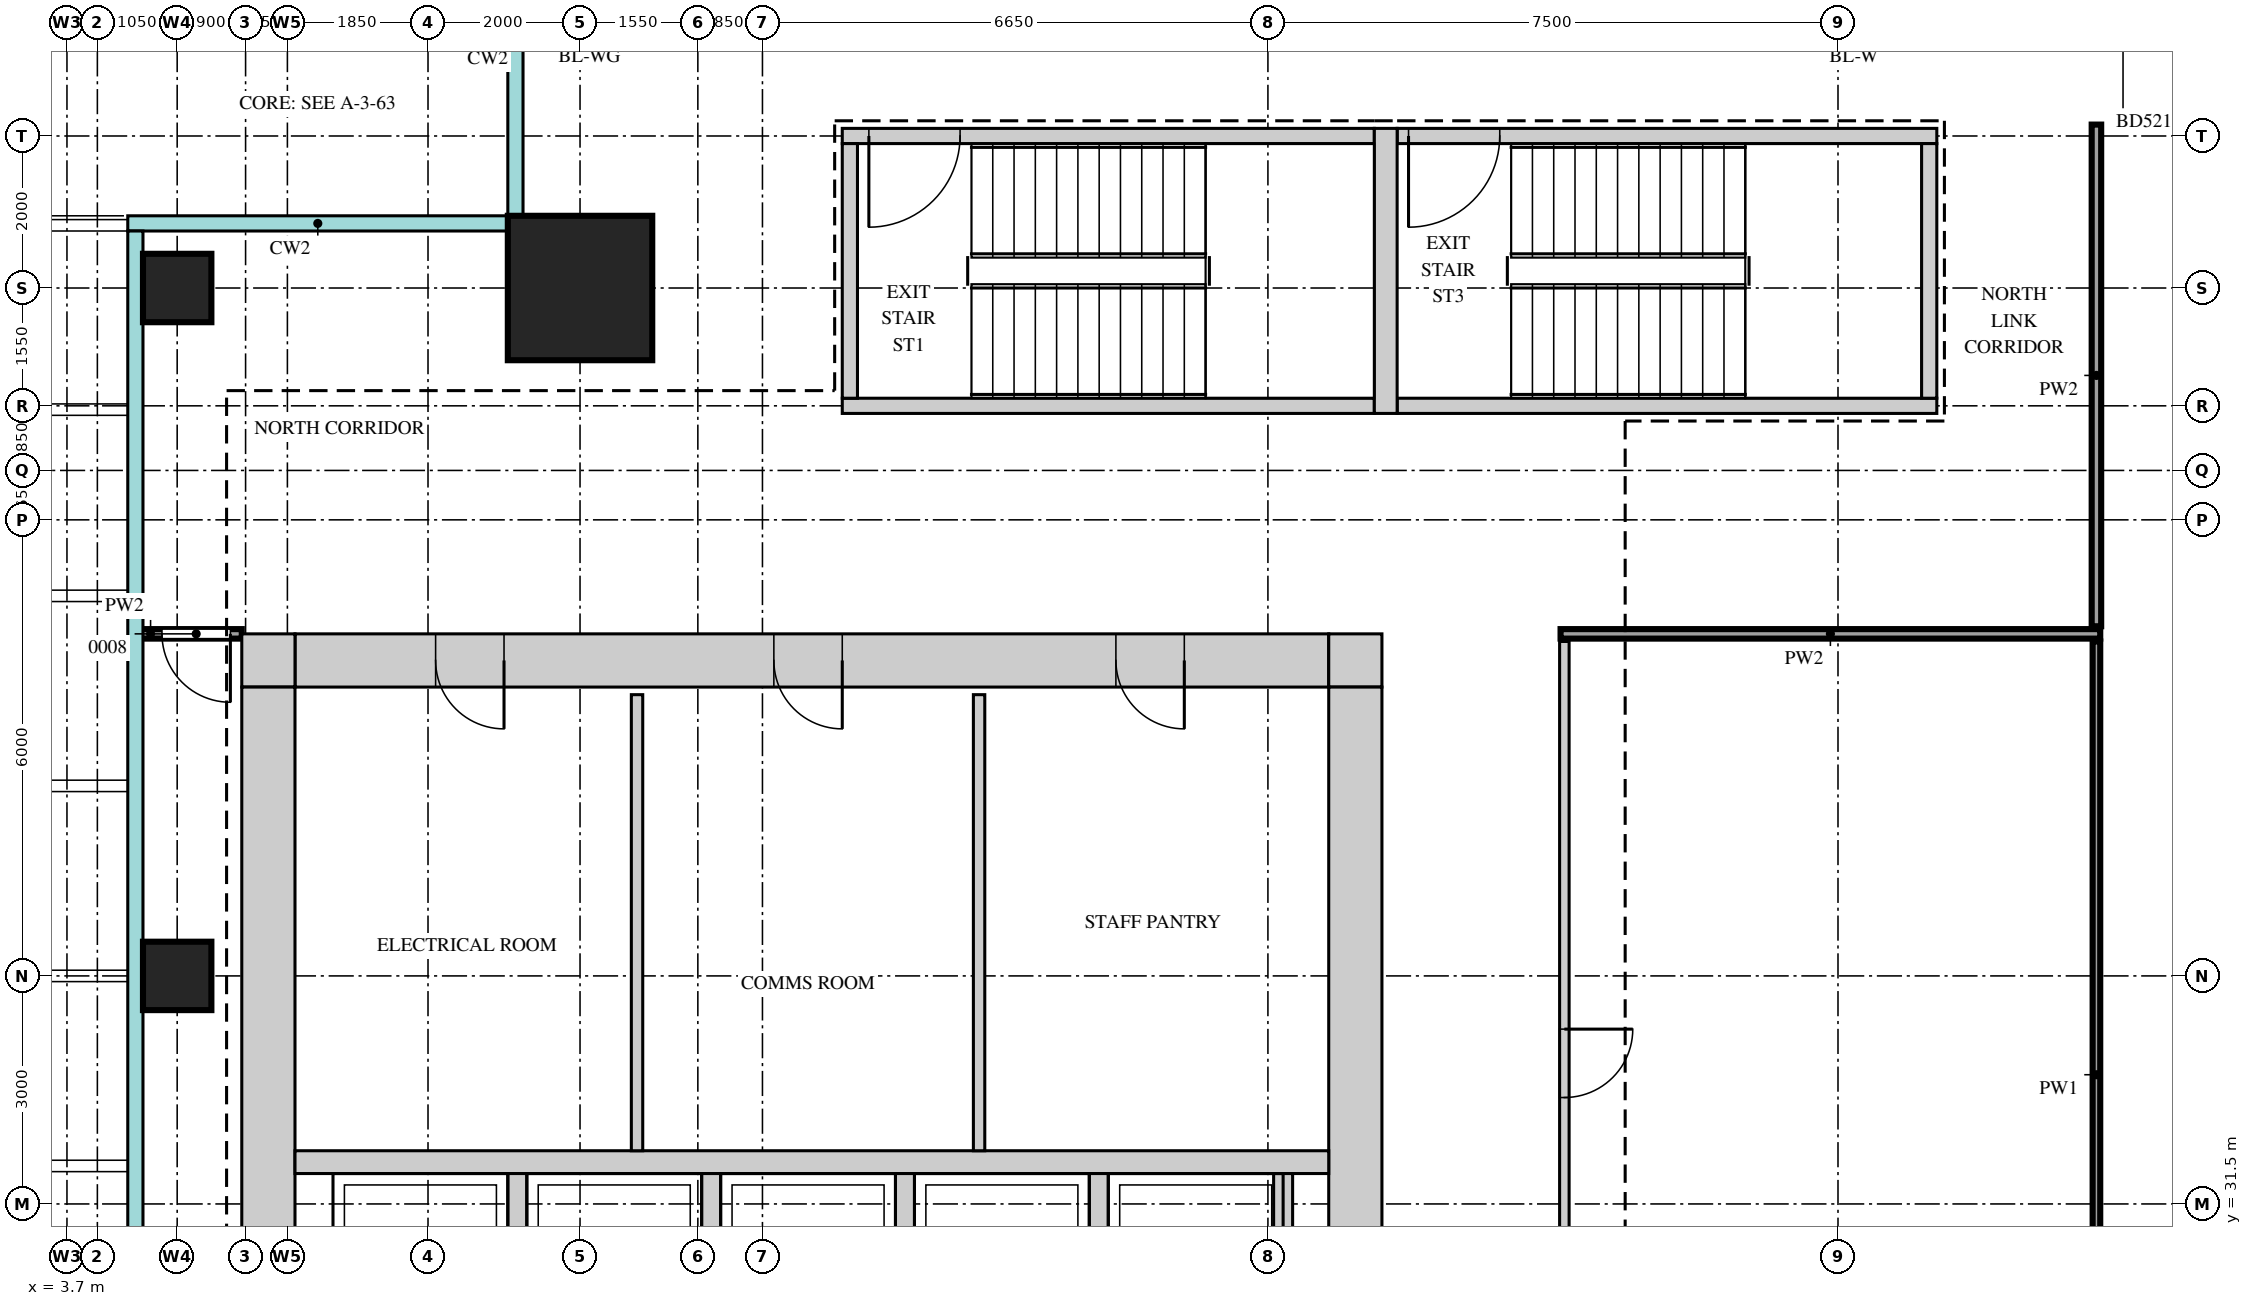
"""IFC4 building model, lengths in metres.
Left out: names, types, materials, properties, quantities, classifications, styles, units other than length and angle.
Written with IfcOpenShell. Run it as: python <this file> out.ifc"""

import sys

from ifc_helpers import new_model, si_unit, direction, frame, frame_2d, origin, origin_2d, place, context, subcontext, project, spatial, rectangle, extrude, source, transform, mapped, element, fill, save


model = new_model("IFC4")
c1 = context("Model", 3, precision=1e-05, world=origin(), true_north=direction((0.0, 1.0)))
c2 = subcontext(c1, "Body", "Model", "MODEL_VIEW")
j1 = project(units=[si_unit("LENGTHUNIT", "METRE"), si_unit("PLANEANGLEUNIT", "RADIAN")], contexts=[c1])
p1 = place(None, origin())
s1 = spatial("IfcSite", under=j1, at=p1, CompositionType="ELEMENT")
p2 = place(p1, origin())
s2 = spatial("IfcBuilding", under=s1, at=p2, CompositionType="ELEMENT")
p3 = place(p2, frame((0.0, 0.0, 234.2)))
s3 = spatial("IfcBuildingStorey", under=s2, at=p3, CompositionType="ELEMENT", Elevation=234.2)
m1 = source(origin(), c2, "Body", "SweptSolid", [
    extrude(rectangle(XDim=13.6, YDim=0.7, at=frame_2d((6.8, 0.0))), origin(), (0.0, 0.0, 1.0), 3.75),
])
p4 = place(p3, frame((6.7, 38.65, 0.0), z_axis=(0.0, 0.0, 1.0), x_axis=(1.0, 0.0, 0.0)))
e1 = element("IfcWall", 1, at=p4, inside=s3, PredefinedType="SHEAR", context=c2, shape_type="MappedRepresentation", body=[
    mapped(m1, transform((0.0, 0.0, 0.0))),
])
m2 = source(origin(), c2, "Body", "SweptSolid", [
    extrude(rectangle(XDim=0.9, YDim=2.1, at=frame_2d((0.45, 1.05))), frame((0.0, 0.36, 0.0), z_axis=(0.0, -1.0, 0.0), x_axis=(1.0, 0.0, 0.0)), (0.0, 0.0, 1.0), 0.72),
])
p5 = place(p4, frame((1.85, 0.0, 0.0)))
e2 = element("IfcOpeningElement", 2, at=p5, cuts=e1, PredefinedType="OPENING", context=c2, shape_type="MappedRepresentation", body=[
    mapped(m2, transform((0.0, 0.0, 0.0))),
])
p6 = place(p4, frame((6.3, 0.0, 0.0)))
e3 = element("IfcOpeningElement", 3, at=p6, cuts=e1, PredefinedType="OPENING", context=c2, shape_type="MappedRepresentation", body=[
    mapped(m2, transform((0.0, 0.0, 0.0))),
])
p7 = place(p4, frame((10.8, 0.0, 0.0)))
e4 = element("IfcOpeningElement", 4, at=p7, cuts=e1, PredefinedType="OPENING", context=c2, shape_type="MappedRepresentation", body=[
    mapped(m2, transform((0.0, 0.0, 0.0))),
])
m3 = source(origin(), c2, "Body", "SweptSolid", [
    extrude(rectangle(XDim=0.7, YDim=0.7, at=frame_2d((0.35, 0.0))), origin(), (0.0, 0.0, 1.0), 3.75),
])
for number, where, z_axis, x_axis in (
    (5, (20.3, 38.65, 0.0), (0.0, 0.0, 1.0), (1.0, 0.0, 0.0)),
    (6, (6.0, 38.65, 0.0), (0.0, 0.0, 1.0), (1.0, 0.0, 0.0)),
):
    element("IfcWall", number, at=place(p3, frame(where, z_axis=z_axis, x_axis=x_axis)), inside=s3, PredefinedType="SHEAR", context=c2, shape_type="MappedRepresentation", body=[
        mapped(m3, transform((0.0, 0.0, 0.0))),
    ])
m4 = source(origin(), c2, "Body", "SweptSolid", [
    extrude(rectangle(XDim=22.6, YDim=0.7, at=frame_2d((11.3, 0.0))), origin(), (0.0, 0.0, 1.0), 3.75),
])
p8 = place(p3, frame((20.65, 15.7, 0.0), z_axis=(0.0, 0.0, 1.0), x_axis=(0.0, 1.0, 0.0)))
e7 = element("IfcWall", 7, at=p8, inside=s3, PredefinedType="SHEAR", context=c2, shape_type="MappedRepresentation", body=[
    mapped(m4, transform((0.0, 0.0, 0.0))),
])
m5 = source(origin(), c2, "Body", "SweptSolid", [
    extrude(rectangle(XDim=1.8, YDim=2.1, at=frame_2d((0.9, 1.05))), frame((0.0, 0.36, 0.0), z_axis=(0.0, -1.0, 0.0), x_axis=(1.0, 0.0, 0.0)), (0.0, 0.0, 1.0), 0.72),
])
p9 = place(p8, frame((10.8, 0.0, 0.0)))
e8 = element("IfcOpeningElement", 8, at=p9, cuts=e7, PredefinedType="OPENING", context=c2, shape_type="MappedRepresentation", body=[
    mapped(m5, transform((0.0, 0.0, 0.0))),
])
p10 = place(p8, frame((0.45, 0.0, 0.0)))
e9 = element("IfcOpeningElement", 9, at=p10, cuts=e7, PredefinedType="OPENING", context=c2, shape_type="MappedRepresentation", body=[
    mapped(m2, transform((0.0, 0.0, 0.0))),
])
m6 = source(origin(), c2, "Body", "SweptSolid", [
    extrude(rectangle(XDim=1.0, YDim=2.1, at=frame_2d((0.5, 1.05))), frame((0.0, 0.36, 0.0), z_axis=(0.0, -1.0, 0.0), x_axis=(1.0, 0.0, 0.0)), (0.0, 0.0, 1.0), 0.72),
])
p11 = place(p8, frame((2.2, 0.0, 0.0)))
e10 = element("IfcOpeningElement", 10, at=p11, cuts=e7, PredefinedType="OPENING", context=c2, shape_type="MappedRepresentation", body=[
    mapped(m6, transform((0.0, 0.0, 0.0))),
])
p12 = place(p8, frame((5.0, 0.0, 0.0)))
e11 = element("IfcOpeningElement", 11, at=p12, cuts=e7, PredefinedType="OPENING", context=c2, shape_type="MappedRepresentation", body=[
    mapped(m2, transform((0.0, 0.0, 0.0))),
])
p13 = place(p3, frame((6.35, 15.7, 0.0), z_axis=(0.0, 0.0, 1.0), x_axis=(0.0, 1.0, 0.0)))
e12 = element("IfcWall", 12, at=p13, inside=s3, PredefinedType="SHEAR", context=c2, shape_type="MappedRepresentation", body=[
    mapped(m4, transform((0.0, 0.0, 0.0))),
])
m7 = source(origin(), c2, "Body", "SweptSolid", [
    extrude(rectangle(XDim=7.0, YDim=0.2, at=frame_2d((3.5, 0.0))), origin(), (0.0, 0.0, 1.0), 3.75),
])
p14 = place(p3, frame((13.9, 45.55, 0.0), z_axis=(0.0, 0.0, 1.0), x_axis=(1.0, 0.0, 0.0)))
e13 = element("IfcWall", 13, at=p14, inside=s3, PredefinedType="SHEAR", context=c2, shape_type="MappedRepresentation", body=[
    mapped(m7, transform((0.0, 0.0, 0.0))),
])
m8 = source(origin(), c2, "Body", "SweptSolid", [
    extrude(rectangle(XDim=1.2, YDim=2.1, at=frame_2d((0.6, 1.05))), frame((0.0, 0.11, 0.0), z_axis=(0.0, -1.0, 0.0), x_axis=(1.0, 0.0, 0.0)), (0.0, 0.0, 1.0), 0.22),
])
p15 = place(p14, frame((0.35, 0.0, 0.0)))
e14 = element("IfcOpeningElement", 14, at=p15, cuts=e13, PredefinedType="OPENING", context=c2, shape_type="MappedRepresentation", body=[
    mapped(m8, transform((0.0, 0.0, 0.0))),
])
p16 = place(p3, frame((13.9, 42.0, 0.0), z_axis=(0.0, 0.0, 1.0), x_axis=(1.0, 0.0, 0.0)))
e15 = element("IfcWall", 15, at=p16, inside=s3, PredefinedType="SHEAR", context=c2, shape_type="MappedRepresentation", body=[
    mapped(m7, transform((0.0, 0.0, 0.0))),
])
m9 = source(origin(), c2, "Body", "SweptSolid", [
    extrude(rectangle(XDim=7.1, YDim=0.2, at=frame_2d((3.55, 0.0))), origin(), (0.0, 0.0, 1.0), 3.75),
])
p17 = place(p3, frame((21.2, 45.55, 0.0), z_axis=(0.0, 0.0, 1.0), x_axis=(1.0, 0.0, 0.0)))
e16 = element("IfcWall", 16, at=p17, inside=s3, PredefinedType="SHEAR", context=c2, shape_type="MappedRepresentation", body=[
    mapped(m9, transform((0.0, 0.0, 0.0))),
])
p18 = place(p17, frame((0.15, 0.0, 0.0)))
e17 = element("IfcOpeningElement", 17, at=p18, cuts=e16, PredefinedType="OPENING", context=c2, shape_type="MappedRepresentation", body=[
    mapped(m8, transform((0.0, 0.0, 0.0))),
])
p19 = place(p3, frame((21.2, 42.0, 0.0), z_axis=(0.0, 0.0, 1.0), x_axis=(1.0, 0.0, 0.0)))
e18 = element("IfcWall", 18, at=p19, inside=s3, PredefinedType="SHEAR", context=c2, shape_type="MappedRepresentation", body=[
    mapped(m9, transform((0.0, 0.0, 0.0))),
])
m10 = source(origin(), c2, "Body", "SweptSolid", [
    extrude(rectangle(XDim=3.75, YDim=0.3, at=frame_2d((1.875, 0.0))), origin(), (0.0, 0.0, 1.0), 3.75),
])
p20 = place(p3, frame((21.05, 41.9, 0.0), z_axis=(0.0, 0.0, 1.0), x_axis=(0.0, 1.0, 0.0)))
e19 = element("IfcWall", 19, at=p20, inside=s3, PredefinedType="SHEAR", context=c2, shape_type="MappedRepresentation", body=[
    mapped(m10, transform((0.0, 0.0, 0.0))),
])
m11 = source(origin(), c2, "Body", "SweptSolid", [
    extrude(rectangle(XDim=3.35, YDim=0.2, at=frame_2d((1.675, 0.0))), origin(), (0.0, 0.0, 1.0), 3.75),
])
for number, where, z_axis, x_axis in (
    (20, (14.0, 42.1, 0.0), (0.0, 0.0, 1.0), (0.0, 1.0, 0.0)),
    (21, (28.2, 42.1, 0.0), (0.0, 0.0, 1.0), (0.0, 1.0, 0.0)),
):
    element("IfcWall", number, at=place(p3, frame(where, z_axis=z_axis, x_axis=x_axis)), inside=s3, PredefinedType="SHEAR", context=c2, shape_type="MappedRepresentation", body=[
        mapped(m11, transform((0.0, 0.0, 0.0))),
    ])
m12 = source(origin(), c2, "Body", "SweptSolid", [
    extrude(rectangle(XDim=13.6, YDim=0.3, at=frame_2d((6.8, 0.0))), origin(), (0.0, 0.0, 1.0), 3.75),
])
p21 = place(p3, frame((6.7, 32.05, 0.0), z_axis=(0.0, 0.0, 1.0), x_axis=(1.0, 0.0, 0.0)))
e22 = element("IfcWall", 22, at=p21, inside=s3, PredefinedType="STANDARD", context=c2, shape_type="MappedRepresentation", body=[
    mapped(m12, transform((0.0, 0.0, 0.0))),
])
m13 = source(origin(), c2, "Body", "SweptSolid", [
    extrude(rectangle(XDim=2.4, YDim=0.25, at=frame_2d((1.2, 0.0))), origin(), (0.0, 0.0, 1.0), 3.75),
])
for number, where, z_axis, x_axis in (
    (23, (17.275, 29.5, 0.0), (0.0, 0.0, 1.0), (0.0, 1.0, 0.0)),
    (24, (19.7, 29.5, 0.0), (0.0, 0.0, 1.0), (0.0, 1.0, 0.0)),
    (25, (9.625, 29.5, 0.0), (0.0, 0.0, 1.0), (0.0, 1.0, 0.0)),
    (26, (12.175, 29.5, 0.0), (0.0, 0.0, 1.0), (0.0, 1.0, 0.0)),
    (27, (14.725, 29.5, 0.0), (0.0, 0.0, 1.0), (0.0, 1.0, 0.0)),
):
    element("IfcWall", number, at=place(p3, frame(where, z_axis=z_axis, x_axis=x_axis)), inside=s3, PredefinedType="STANDARD", context=c2, shape_type="MappedRepresentation", body=[
        mapped(m13, transform((0.0, 0.0, 0.0))),
    ])
m14 = source(origin(), c2, "Body", "SweptSolid", [
    extrude(rectangle(XDim=1.9, YDim=1.9, at=origin_2d()), origin(), (0.0, 0.0, 1.0), 4.0),
])
p22 = place(p3, frame((10.45, 43.55, 0.0), z_axis=(0.0, 0.0, 1.0), x_axis=(1.0, 0.0, 0.0)))
e28 = element("IfcColumn", 28, at=p22, inside=s3, PredefinedType="COLUMN", context=c2, shape_type="MappedRepresentation", body=[
    mapped(m14, transform((0.0, 0.0, 0.0))),
])
m15 = source(origin(), c2, "Body", "SweptSolid", [
    extrude(rectangle(XDim=0.9, YDim=0.9, at=origin_2d()), origin(), (0.0, 0.0, 1.0), 3.75),
])
for number, where, z_axis, x_axis in (
    (29, (5.15, 34.5, 0.0), (0.0, 0.0, 1.0), (1.0, 0.0, 0.0)),
    (30, (5.15, 43.55, 0.0), (0.0, 0.0, 1.0), (1.0, 0.0, 0.0)),
):
    element("IfcColumn", number, at=place(p3, frame(where, z_axis=z_axis, x_axis=x_axis)), inside=s3, PredefinedType="COLUMN", context=c2, shape_type="MappedRepresentation", body=[
        mapped(m15, transform((0.0, 0.0, 0.0))),
    ])
m16 = source(origin(), c2, "Body", "SweptSolid", [
    extrude(rectangle(XDim=11.4, YDim=0.125, at=frame_2d((5.7, 0.0))), origin(), (0.0, 0.0, 1.0), 3.8),
])
p23 = place(p3, frame((23.4, 27.5, 0.0), z_axis=(0.0, 0.0, 1.0), x_axis=(0.0, 1.0, 0.0)))
e31 = element("IfcWall", 31, at=p23, inside=s3, PredefinedType="PARTITIONING", context=c2, shape_type="MappedRepresentation", body=[
    mapped(m16, transform((0.0, 0.0, 0.0))),
])
m17 = source(origin(), c2, "Body", "SweptSolid", [
    extrude(rectangle(XDim=0.9, YDim=2.1, at=frame_2d((0.45, 1.05))), frame((0.0, 0.073, 0.0), z_axis=(0.0, -1.0, 0.0), x_axis=(1.0, 0.0, 0.0)), (0.0, 0.0, 1.0), 0.145),
])
p24 = place(p23, frame((5.4, 0.0, 0.0)))
e32 = element("IfcOpeningElement", 32, at=p24, cuts=e31, PredefinedType="OPENING", context=c2, shape_type="MappedRepresentation", body=[
    mapped(m17, transform((0.0, 0.0, 0.0))),
])
m18 = source(origin(), c2, "Body", "SweptSolid", [
    extrude(rectangle(XDim=11.4, YDim=0.1, at=frame_2d((5.7, 0.0))), origin(), (0.0, 0.0, 1.0), 3.8),
])
p25 = place(p3, frame((30.4, 27.5, 0.0), z_axis=(0.0, 0.0, 1.0), x_axis=(0.0, 1.0, 0.0)))
e33 = element("IfcWall", 33, at=p25, inside=s3, PredefinedType="PARTITIONING", context=c2, shape_type="MappedRepresentation", body=[
    mapped(m18, transform((0.0, 0.0, 0.0))),
])
m19 = source(origin(), c2, "Body", "SweptSolid", [
    extrude(rectangle(XDim=6.0, YDim=0.15, at=frame_2d((3.0, 0.0))), origin(), (0.0, 0.0, 1.0), 3.8),
])
for number, where, z_axis, x_axis in (
    (34, (11.2, 32.2, 0.0), (0.0, 0.0, 1.0), (0.0, 1.0, 0.0)),
    (35, (15.7, 32.2, 0.0), (0.0, 0.0, 1.0), (0.0, 1.0, 0.0)),
):
    element("IfcWall", number, at=place(p3, frame(where, z_axis=z_axis, x_axis=x_axis)), inside=s3, PredefinedType="PARTITIONING", context=c2, shape_type="MappedRepresentation", body=[
        mapped(m19, transform((0.0, 0.0, 0.0))),
    ])
m20 = source(origin(), c2, "Body", "SweptSolid", [
    extrude(rectangle(XDim=1.35, YDim=0.125, at=frame_2d((0.675, 0.0))), origin(), (0.0, 0.0, 1.0), 3.8),
])
p26 = place(p3, frame((4.65, 39.0, 0.0), z_axis=(0.0, 0.0, 1.0), x_axis=(1.0, 0.0, 0.0)))
e36 = element("IfcWall", 36, at=p26, inside=s3, PredefinedType="PARTITIONING", context=c2, shape_type="MappedRepresentation", body=[
    mapped(m20, transform((0.0, 0.0, 0.0))),
])
p27 = place(p26, frame((0.3, 0.0, 0.0)))
e37 = element("IfcOpeningElement", 37, at=p27, cuts=e36, PredefinedType="OPENING", context=c2, shape_type="MappedRepresentation", body=[
    mapped(m17, transform((0.0, 0.0, 0.0))),
])
m21 = source(origin(), c2, "Body", "SweptSolid", [
    extrude(rectangle(XDim=7.1, YDim=0.125, at=frame_2d((3.55, 0.0))), origin(), (0.0, 0.0, 1.0), 3.8),
])
p28 = place(p3, frame((23.35, 39.0, 0.0), z_axis=(0.0, 0.0, 1.0), x_axis=(1.0, 0.0, 0.0)))
e38 = element("IfcWall", 38, at=p28, inside=s3, PredefinedType="PARTITIONING", context=c2, shape_type="MappedRepresentation", body=[
    mapped(m21, transform((0.0, 0.0, 0.0))),
])
m22 = source(origin(), c2, "Body", "SweptSolid", [
    extrude(rectangle(XDim=6.6, YDim=0.125, at=frame_2d((3.3, 0.0))), origin(), (0.0, 0.0, 1.0), 3.8),
])
p29 = place(p3, frame((30.4, 39.1, 0.0), z_axis=(0.0, 0.0, 1.0), x_axis=(0.0, 1.0, 0.0)))
e39 = element("IfcWall", 39, at=p29, inside=s3, PredefinedType="PARTITIONING", context=c2, shape_type="MappedRepresentation", body=[
    mapped(m22, transform((0.0, 0.0, 0.0))),
])
m23 = source(origin(), c2, "Body", "SweptSolid", [
    extrude(rectangle(XDim=0.9, YDim=2.1, at=frame_2d((0.45, 1.05))), frame((0.0, 0.3, 0.0), z_axis=(0.0, -1.0, 0.0), x_axis=(1.0, 0.0, 0.0)), (0.0, 0.0, 1.0), 0.6),
])
p30 = place(p5, origin())
e40 = element("IfcDoor", 40, at=p30, inside=s3, OperationType="SINGLE_SWING_RIGHT", PredefinedType="DOOR", context=c2, shape_type="MappedRepresentation", body=[
    mapped(m23, transform((0.0, 0.0, 0.0))),
])
fill(e2, e40)
p31 = place(p6, origin())
e41 = element("IfcDoor", 41, at=p31, inside=s3, OperationType="SINGLE_SWING_RIGHT", PredefinedType="DOOR", context=c2, shape_type="MappedRepresentation", body=[
    mapped(m23, transform((0.0, 0.0, 0.0))),
])
fill(e3, e41)
p32 = place(p7, origin())
e42 = element("IfcDoor", 42, at=p32, inside=s3, OperationType="SINGLE_SWING_RIGHT", PredefinedType="DOOR", context=c2, shape_type="MappedRepresentation", body=[
    mapped(m23, transform((0.0, 0.0, 0.0))),
])
fill(e4, e42)
m24 = source(origin(), c2, "Body", "SweptSolid", [
    extrude(rectangle(XDim=0.9, YDim=2.1, at=frame_2d((0.45, 1.05))), frame((0.0, 0.025, 0.0), z_axis=(0.0, -1.0, 0.0), x_axis=(1.0, 0.0, 0.0)), (0.0, 0.0, 1.0), 0.05),
])
p33 = place(p27, origin())
e43 = element("IfcDoor", 43, at=p33, inside=s3, OperationType="SINGLE_SWING_RIGHT", PredefinedType="DOOR", context=c2, shape_type="MappedRepresentation", body=[
    mapped(m24, transform((0.0, 0.0, 0.0))),
])
fill(e37, e43)
p34 = place(p24, origin())
e44 = element("IfcDoor", 44, at=p34, inside=s3, OperationType="SINGLE_SWING_RIGHT", PredefinedType="DOOR", context=c2, shape_type="MappedRepresentation", body=[
    mapped(m24, transform((0.0, 0.0, 0.0))),
])
fill(e32, e44)
m25 = source(origin(), c2, "Body", "SweptSolid", [
    extrude(rectangle(XDim=1.2, YDim=2.1, at=frame_2d((0.6, 1.05))), frame((0.0, 0.025, 0.0), z_axis=(0.0, -1.0, 0.0), x_axis=(1.0, 0.0, 0.0)), (0.0, 0.0, 1.0), 0.05),
])
p35 = place(p15, origin())
e45 = element("IfcDoor", 45, at=p35, inside=s3, OperationType="SINGLE_SWING_LEFT", PredefinedType="DOOR", context=c2, shape_type="MappedRepresentation", body=[
    mapped(m25, transform((0.0, 0.0, 0.0))),
])
fill(e14, e45)
p36 = place(p18, origin())
e46 = element("IfcDoor", 46, at=p36, inside=s3, OperationType="SINGLE_SWING_LEFT", PredefinedType="DOOR", context=c2, shape_type="MappedRepresentation", body=[
    mapped(m25, transform((0.0, 0.0, 0.0))),
])
fill(e17, e46)
save(model, sys.argv[1])
